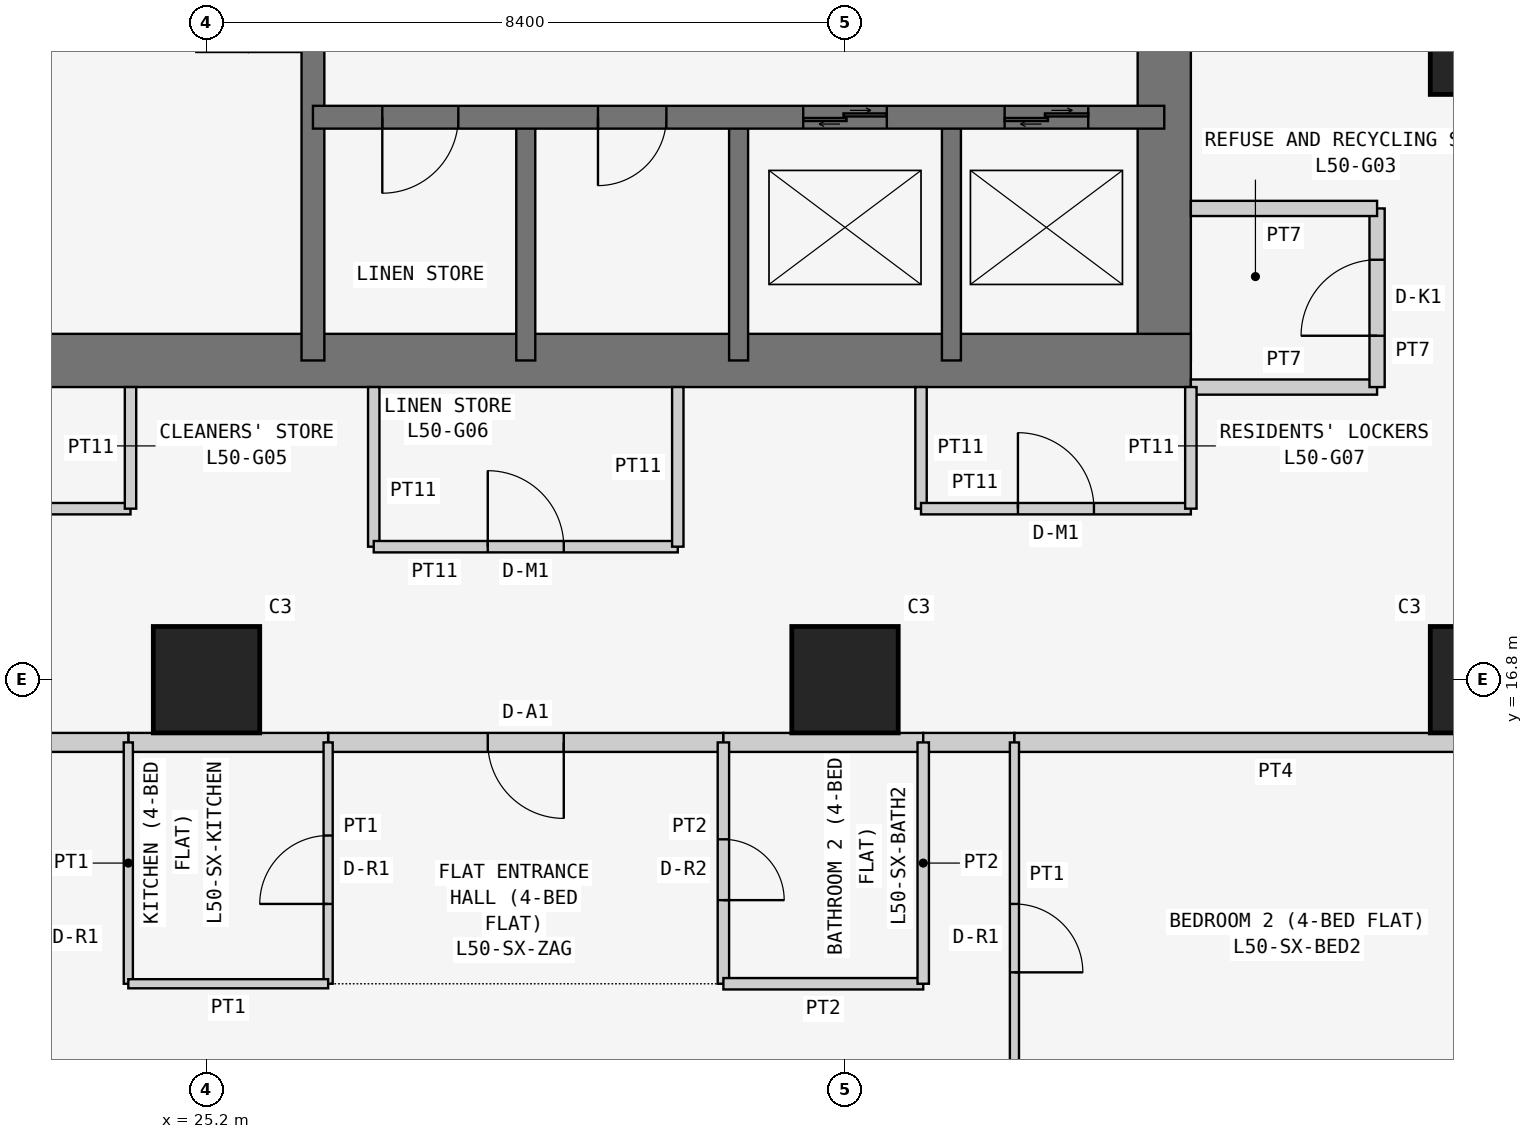
"""IFC4 building model, lengths in metres.
Left out: names, types, materials, properties, quantities, classifications, styles, units other than length and angle.
Written with IfcOpenShell. Run it as: python <this file> out.ifc"""

import sys

from ifc_helpers import new_model, si_unit, direction, frame, frame_2d, origin, origin_2d, place, context, subcontext, project, spatial, rectangle, extrude, element, fill, save


model = new_model("IFC4")
c1 = context("Model", 3, precision=1e-05, world=origin(), true_north=direction((0.0, 1.0)))
c2 = subcontext(c1, "Body", "Model", "MODEL_VIEW")
j1 = project(units=[si_unit("LENGTHUNIT", "METRE"), si_unit("PLANEANGLEUNIT", "RADIAN")], contexts=[c1])
p1 = place(None, origin())
s1 = spatial("IfcSite", under=j1, at=p1, CompositionType="ELEMENT")
p2 = place(p1, origin())
s2 = spatial("IfcBuilding", under=s1, at=p2, CompositionType="ELEMENT")
p3 = place(p2, frame((0.0, 0.0, 194.1)))
s3 = spatial("IfcBuildingStorey", under=s2, at=p3, CompositionType="ELEMENT", Elevation=194.1)
for number, where, z_axis, x_axis in (
    (1, (25.2, 16.8, 0.0), (0.0, 0.0, 1.0), (1.0, 0.0, 0.0)),
    (2, (33.6, 16.8, 0.0), (0.0, 0.0, 1.0), (1.0, 0.0, 0.0)),
    (3, (42.0, 16.8, 0.0), (0.0, 0.0, 1.0), (1.0, 0.0, 0.0)),
    (4, (42.0, 25.2, 0.0), (0.0, 0.0, 1.0), (1.0, 0.0, 0.0)),
):
    element("IfcColumn", number, at=place(p3, frame(where, z_axis=z_axis, x_axis=x_axis)), inside=s3, PredefinedType="COLUMN", context=c2, shape_type="SweptSolid", body=[
        extrude(rectangle(XDim=1.4, YDim=1.4, at=origin_2d()), origin(), (0.0, 0.0, 1.0), 3.6),
    ])
p4 = place(p3, frame((21.0, 21.0, 0.0), z_axis=(0.0, 0.0, 1.0), x_axis=(1.0, 0.0, 0.0)))
e5 = element("IfcWall", 5, at=p4, inside=s3, PredefinedType="SHEAR", context=c2, shape_type="SweptSolid", body=[
    extrude(rectangle(XDim=17.15, YDim=0.7, at=frame_2d((8.575, 0.0))), origin(), (0.0, 0.0, 1.0), 3.6),
])
p5 = place(p3, frame((37.8, 21.0, 0.0), z_axis=(0.0, 0.0, 1.0), x_axis=(0.0, 1.0, 0.0)))
e6 = element("IfcWall", 6, at=p5, inside=s3, PredefinedType="SHEAR", context=c2, shape_type="SweptSolid", body=[
    extrude(rectangle(XDim=17.15, YDim=0.7, at=frame_2d((8.575, 0.0))), origin(), (0.0, 0.0, 1.0), 3.6),
])
p6 = place(p5, frame((5.2, 0.0, 0.0)))
e7 = element("IfcOpeningElement", 7, at=p6, cuts=e6, PredefinedType="OPENING", context=c2, shape_type="SweptSolid", body=[
    extrude(rectangle(XDim=1.2, YDim=2.1, at=frame_2d((0.6, 1.05))), frame((0.0, 0.36, 0.0), z_axis=(0.0, -1.0, 0.0), x_axis=(1.0, 0.0, 0.0)), (0.0, 0.0, 1.0), 0.72),
])
p7 = place(p3, frame((26.6, 21.0, 0.0), z_axis=(0.0, 0.0, 1.0), x_axis=(0.0, 1.0, 0.0)))
e8 = element("IfcWall", 8, at=p7, inside=s3, PredefinedType="SHEAR", context=c2, shape_type="SweptSolid", body=[
    extrude(rectangle(XDim=16.8, YDim=0.3, at=frame_2d((8.4, 0.0))), origin(), (0.0, 0.0, 1.0), 3.6),
])
p8 = place(p7, frame((10.4, 0.0, 0.0)))
e9 = element("IfcOpeningElement", 9, at=p8, cuts=e8, PredefinedType="OPENING", context=c2, shape_type="SweptSolid", body=[
    extrude(rectangle(XDim=1.2, YDim=2.1, at=frame_2d((0.6, 1.05))), frame((0.0, 0.16, 0.0), z_axis=(0.0, -1.0, 0.0), x_axis=(1.0, 0.0, 0.0)), (0.0, 0.0, 1.0), 0.32),
])
p9 = place(p3, frame((26.6, 24.2, 0.0), z_axis=(0.0, 0.0, 1.0), x_axis=(1.0, 0.0, 0.0)))
e10 = element("IfcWall", 10, at=p9, inside=s3, PredefinedType="SHEAR", context=c2, shape_type="SweptSolid", body=[
    extrude(rectangle(XDim=11.2, YDim=0.3, at=frame_2d((5.6, 0.0))), origin(), (0.0, 0.0, 1.0), 3.6),
])
p10 = place(p9, frame((0.913, 0.0, 0.0)))
e11 = element("IfcOpeningElement", 11, at=p10, cuts=e10, PredefinedType="OPENING", context=c2, shape_type="SweptSolid", body=[
    extrude(rectangle(XDim=1.0, YDim=2.1, at=frame_2d((0.5, 1.05))), frame((0.0, 0.16, 0.0), z_axis=(0.0, -1.0, 0.0), x_axis=(1.0, 0.0, 0.0)), (0.0, 0.0, 1.0), 0.32),
])
p11 = place(p9, frame((3.75, 0.0, 0.0)))
e12 = element("IfcOpeningElement", 12, at=p11, cuts=e10, PredefinedType="OPENING", context=c2, shape_type="SweptSolid", body=[
    extrude(rectangle(XDim=0.9, YDim=2.1, at=frame_2d((0.45, 1.05))), frame((0.0, 0.16, 0.0), z_axis=(0.0, -1.0, 0.0), x_axis=(1.0, 0.0, 0.0)), (0.0, 0.0, 1.0), 0.32),
])
p12 = place(p9, frame((6.45, 0.0, 0.0)))
e13 = element("IfcOpeningElement", 13, at=p12, cuts=e10, PredefinedType="OPENING", context=c2, shape_type="SweptSolid", body=[
    extrude(rectangle(XDim=1.1, YDim=2.1, at=frame_2d((0.55, 1.05))), frame((0.0, 0.16, 0.0), z_axis=(0.0, -1.0, 0.0), x_axis=(1.0, 0.0, 0.0)), (0.0, 0.0, 1.0), 0.32),
])
p13 = place(p9, frame((9.1, 0.0, 0.0)))
e14 = element("IfcOpeningElement", 14, at=p13, cuts=e10, PredefinedType="OPENING", context=c2, shape_type="SweptSolid", body=[
    extrude(rectangle(XDim=1.1, YDim=2.1, at=frame_2d((0.55, 1.05))), frame((0.0, 0.16, 0.0), z_axis=(0.0, -1.0, 0.0), x_axis=(1.0, 0.0, 0.0)), (0.0, 0.0, 1.0), 0.32),
])
for number, where, z_axis, x_axis in (
    (15, (29.4, 21.0, 0.0), (0.0, 0.0, 1.0), (0.0, 1.0, 0.0)),
    (16, (32.2, 21.0, 0.0), (0.0, 0.0, 1.0), (0.0, 1.0, 0.0)),
    (17, (35.0, 21.0, 0.0), (0.0, 0.0, 1.0), (0.0, 1.0, 0.0)),
):
    element("IfcWall", number, at=place(p3, frame(where, z_axis=z_axis, x_axis=x_axis)), inside=s3, PredefinedType="SHEAR", context=c2, shape_type="SweptSolid", body=[
        extrude(rectangle(XDim=3.2, YDim=0.25, at=frame_2d((1.6, 0.0))), origin(), (0.0, 0.0, 1.0), 3.6),
    ])
p14 = place(p3, frame((38.15, 20.65, 0.0), z_axis=(0.0, 0.0, 1.0), x_axis=(1.0, 0.0, 0.0)))
e18 = element("IfcWall", 18, at=p14, inside=s3, PredefinedType="PARTITIONING", context=c2, shape_type="SweptSolid", body=[
    extrude(rectangle(XDim=2.45, YDim=0.2, at=frame_2d((1.225, 0.0))), origin(), (0.0, 0.0, 1.0), 3.45),
])
p15 = place(p3, frame((40.6, 20.65, 0.0), z_axis=(0.0, 0.0, 1.0), x_axis=(0.0, 1.0, 0.0)))
e19 = element("IfcWall", 19, at=p15, inside=s3, PredefinedType="PARTITIONING", context=c2, shape_type="SweptSolid", body=[
    extrude(rectangle(XDim=2.35, YDim=0.2, at=frame_2d((1.175, 0.0))), origin(), (0.0, 0.0, 1.0), 3.45),
])
p16 = place(p15, frame((0.675, 0.0, 0.0)))
e20 = element("IfcOpeningElement", 20, at=p16, cuts=e19, PredefinedType="OPENING", context=c2, shape_type="SweptSolid", body=[
    extrude(rectangle(XDim=1.0, YDim=2.1, at=frame_2d((0.5, 1.05))), frame((0.0, 0.11, 0.0), z_axis=(0.0, -1.0, 0.0), x_axis=(1.0, 0.0, 0.0)), (0.0, 0.0, 1.0), 0.22),
])
p17 = place(p3, frame((40.6, 23.0, 0.0), z_axis=(0.0, 0.0, 1.0), x_axis=(-1.0, 0.0, 0.0)))
e21 = element("IfcWall", 21, at=p17, inside=s3, PredefinedType="PARTITIONING", context=c2, shape_type="SweptSolid", body=[
    extrude(rectangle(XDim=2.45, YDim=0.2, at=frame_2d((1.225, 0.0))), origin(), (0.0, 0.0, 1.0), 3.45),
])
p18 = place(p3, frame((20.65, 19.05, 0.0), z_axis=(0.0, 0.0, 1.0), x_axis=(1.0, 0.0, 0.0)))
e22 = element("IfcWall", 22, at=p18, inside=s3, PredefinedType="PARTITIONING", context=c2, shape_type="SweptSolid", body=[
    extrude(rectangle(XDim=3.55, YDim=0.15, at=frame_2d((1.775, 0.0))), origin(), (0.0, 0.0, 1.0), 3.45),
])
p19 = place(p18, frame((1.275, 0.0, 0.0)))
e23 = element("IfcOpeningElement", 23, at=p19, cuts=e22, PredefinedType="OPENING", context=c2, shape_type="SweptSolid", body=[
    extrude(rectangle(XDim=1.0, YDim=2.1, at=frame_2d((0.5, 1.05))), frame((0.0, 0.085, 0.0), z_axis=(0.0, -1.0, 0.0), x_axis=(1.0, 0.0, 0.0)), (0.0, 0.0, 1.0), 0.17),
])
p20 = place(p3, frame((24.2, 19.05, 0.0), z_axis=(0.0, 0.0, 1.0), x_axis=(0.0, 1.0, 0.0)))
e24 = element("IfcWall", 24, at=p20, inside=s3, PredefinedType="PARTITIONING", context=c2, shape_type="SweptSolid", body=[
    extrude(rectangle(XDim=1.6, YDim=0.15, at=frame_2d((0.8, 0.0))), origin(), (0.0, 0.0, 1.0), 3.45),
])
p21 = place(p3, frame((27.4, 20.65, 0.0), z_axis=(0.0, 0.0, 1.0), x_axis=(0.0, -1.0, 0.0)))
e25 = element("IfcWall", 25, at=p21, inside=s3, PredefinedType="PARTITIONING", context=c2, shape_type="SweptSolid", body=[
    extrude(rectangle(XDim=2.1, YDim=0.15, at=frame_2d((1.05, 0.0))), origin(), (0.0, 0.0, 1.0), 3.45),
])
p22 = place(p3, frame((27.4, 18.55, 0.0), z_axis=(0.0, 0.0, 1.0), x_axis=(1.0, 0.0, 0.0)))
e26 = element("IfcWall", 26, at=p22, inside=s3, PredefinedType="PARTITIONING", context=c2, shape_type="SweptSolid", body=[
    extrude(rectangle(XDim=4.0, YDim=0.15, at=frame_2d((2.0, 0.0))), origin(), (0.0, 0.0, 1.0), 3.45),
])
p23 = place(p22, frame((1.5, 0.0, 0.0)))
e27 = element("IfcOpeningElement", 27, at=p23, cuts=e26, PredefinedType="OPENING", context=c2, shape_type="SweptSolid", body=[
    extrude(rectangle(XDim=1.0, YDim=2.1, at=frame_2d((0.5, 1.05))), frame((0.0, 0.085, 0.0), z_axis=(0.0, -1.0, 0.0), x_axis=(1.0, 0.0, 0.0)), (0.0, 0.0, 1.0), 0.17),
])
p24 = place(p3, frame((31.4, 18.55, 0.0), z_axis=(0.0, 0.0, 1.0), x_axis=(0.0, 1.0, 0.0)))
e28 = element("IfcWall", 28, at=p24, inside=s3, PredefinedType="PARTITIONING", context=c2, shape_type="SweptSolid", body=[
    extrude(rectangle(XDim=2.1, YDim=0.15, at=frame_2d((1.05, 0.0))), origin(), (0.0, 0.0, 1.0), 3.45),
])
p25 = place(p3, frame((34.6, 20.65, 0.0), z_axis=(0.0, 0.0, 1.0), x_axis=(0.0, -1.0, 0.0)))
e29 = element("IfcWall", 29, at=p25, inside=s3, PredefinedType="PARTITIONING", context=c2, shape_type="SweptSolid", body=[
    extrude(rectangle(XDim=1.6, YDim=0.15, at=frame_2d((0.8, 0.0))), origin(), (0.0, 0.0, 1.0), 3.45),
])
p26 = place(p3, frame((34.6, 19.05, 0.0), z_axis=(0.0, 0.0, 1.0), x_axis=(1.0, 0.0, 0.0)))
e30 = element("IfcWall", 30, at=p26, inside=s3, PredefinedType="PARTITIONING", context=c2, shape_type="SweptSolid", body=[
    extrude(rectangle(XDim=3.55, YDim=0.15, at=frame_2d((1.775, 0.0))), origin(), (0.0, 0.0, 1.0), 3.45),
])
p27 = place(p26, frame((1.275, 0.0, 0.0)))
e31 = element("IfcOpeningElement", 31, at=p27, cuts=e30, PredefinedType="OPENING", context=c2, shape_type="SweptSolid", body=[
    extrude(rectangle(XDim=1.0, YDim=2.1, at=frame_2d((0.5, 1.05))), frame((0.0, 0.085, 0.0), z_axis=(0.0, -1.0, 0.0), x_axis=(1.0, 0.0, 0.0)), (0.0, 0.0, 1.0), 0.17),
])
p28 = place(p3, frame((38.15, 19.05, 0.0), z_axis=(0.0, 0.0, 1.0), x_axis=(0.0, 1.0, 0.0)))
e32 = element("IfcWall", 32, at=p28, inside=s3, PredefinedType="PARTITIONING", context=c2, shape_type="SweptSolid", body=[
    extrude(rectangle(XDim=1.6, YDim=0.15, at=frame_2d((0.8, 0.0))), origin(), (0.0, 0.0, 1.0), 3.45),
])
p29 = place(p3, frame((32.0, 15.975, 0.0), z_axis=(0.0, 0.0, 1.0), x_axis=(-1.0, 0.0, 0.0)))
e33 = element("IfcWall", 33, at=p29, inside=s3, PredefinedType="PARTITIONING", context=c2, shape_type="SweptSolid", body=[
    extrude(rectangle(XDim=5.2, YDim=0.25, at=frame_2d((2.6, 0.0))), origin(), (0.0, 0.0, 1.0), 3.45),
])
p30 = place(p29, frame((2.1, 0.0, 0.0)))
e34 = element("IfcOpeningElement", 34, at=p30, cuts=e33, PredefinedType="OPENING", context=c2, shape_type="SweptSolid", body=[
    extrude(rectangle(XDim=1.0, YDim=2.1, at=frame_2d((0.5, 1.05))), frame((0.0, 0.135, 0.0), z_axis=(0.0, -1.0, 0.0), x_axis=(1.0, 0.0, 0.0)), (0.0, 0.0, 1.0), 0.27),
])
p31 = place(p3, frame((34.629, 15.975, 0.0), z_axis=(0.0, 0.0, 1.0), x_axis=(-1.0, 0.0, 0.0)))
e35 = element("IfcWall", 35, at=p31, inside=s3, PredefinedType="PARTITIONING", context=c2, shape_type="SweptSolid", body=[
    extrude(rectangle(XDim=2.629, YDim=0.25, at=frame_2d((1.314, 0.0))), origin(), (0.0, 0.0, 1.0), 3.45),
])
p32 = place(p3, frame((26.8, 15.975, 0.0), z_axis=(0.0, 0.0, 1.0), x_axis=(-1.0, 0.0, 0.0)))
e36 = element("IfcWall", 36, at=p32, inside=s3, PredefinedType="PARTITIONING", context=c2, shape_type="SweptSolid", body=[
    extrude(rectangle(XDim=2.629, YDim=0.25, at=frame_2d((1.314, 0.0))), origin(), (0.0, 0.0, 1.0), 3.45),
])
p33 = place(p3, frame((24.171, 15.975, 0.0), z_axis=(0.0, 0.0, 1.0), x_axis=(-1.0, 0.0, 0.0)))
e37 = element("IfcWall", 37, at=p33, inside=s3, PredefinedType="PARTITIONING", context=c2, shape_type="SweptSolid", body=[
    extrude(rectangle(XDim=1.2, YDim=0.25, at=frame_2d((0.6, 0.0))), origin(), (0.0, 0.0, 1.0), 3.45),
])
p34 = place(p3, frame((35.829, 15.975, 0.0), z_axis=(0.0, 0.0, 1.0), x_axis=(-1.0, 0.0, 0.0)))
e38 = element("IfcWall", 38, at=p34, inside=s3, PredefinedType="PARTITIONING", context=c2, shape_type="SweptSolid", body=[
    extrude(rectangle(XDim=1.2, YDim=0.25, at=frame_2d((0.6, 0.0))), origin(), (0.0, 0.0, 1.0), 3.45),
])
p35 = place(p3, frame((42.7, 15.975, 0.0), z_axis=(0.0, 0.0, 1.0), x_axis=(-1.0, 0.0, 0.0)))
e39 = element("IfcWall", 39, at=p35, inside=s3, PredefinedType="PARTITIONING", context=c2, shape_type="SweptSolid", body=[
    extrude(rectangle(XDim=6.871, YDim=0.25, at=frame_2d((3.436, 0.0))), origin(), (0.0, 0.0, 1.0), 3.45),
])
p36 = place(p3, frame((32.0, 12.8, 0.0), z_axis=(0.0, 0.0, 1.0), x_axis=(0.0, 1.0, 0.0)))
e40 = element("IfcWall", 40, at=p36, inside=s3, PredefinedType="PARTITIONING", context=c2, shape_type="SweptSolid", body=[
    extrude(rectangle(XDim=3.175, YDim=0.15, at=frame_2d((1.587, 0.0))), origin(), (0.0, 0.0, 1.0), 3.45),
])
p37 = place(p36, frame((1.1, 0.0, 0.0)))
e41 = element("IfcOpeningElement", 41, at=p37, cuts=e40, PredefinedType="OPENING", context=c2, shape_type="SweptSolid", body=[
    extrude(rectangle(XDim=0.8, YDim=2.1, at=frame_2d((0.4, 1.05))), frame((0.0, 0.085, 0.0), z_axis=(0.0, -1.0, 0.0), x_axis=(1.0, 0.0, 0.0)), (0.0, 0.0, 1.0), 0.17),
])
p38 = place(p3, frame((26.8, 15.975, 0.0), z_axis=(0.0, 0.0, 1.0), x_axis=(0.0, -1.0, 0.0)))
e42 = element("IfcWall", 42, at=p38, inside=s3, PredefinedType="PARTITIONING", context=c2, shape_type="SweptSolid", body=[
    extrude(rectangle(XDim=3.175, YDim=0.12, at=frame_2d((1.587, 0.0))), origin(), (0.0, 0.0, 1.0), 3.45),
])
p39 = place(p38, frame((1.225, 0.0, 0.0)))
e43 = element("IfcOpeningElement", 43, at=p39, cuts=e42, PredefinedType="OPENING", context=c2, shape_type="SweptSolid", body=[
    extrude(rectangle(XDim=0.9, YDim=2.1, at=frame_2d((0.45, 1.05))), frame((0.0, 0.07, 0.0), z_axis=(0.0, -1.0, 0.0), x_axis=(1.0, 0.0, 0.0)), (0.0, 0.0, 1.0), 0.14),
])
p40 = place(p3, frame((32.0, 12.8, 0.0), z_axis=(0.0, 0.0, 1.0), x_axis=(1.0, 0.0, 0.0)))
e44 = element("IfcWall", 44, at=p40, inside=s3, PredefinedType="PARTITIONING", context=c2, shape_type="SweptSolid", body=[
    extrude(rectangle(XDim=2.629, YDim=0.15, at=frame_2d((1.314, 0.0))), origin(), (0.0, 0.0, 1.0), 3.45),
])
p41 = place(p3, frame((34.629, 12.8, 0.0), z_axis=(0.0, 0.0, 1.0), x_axis=(0.0, 1.0, 0.0)))
e45 = element("IfcWall", 45, at=p41, inside=s3, PredefinedType="PARTITIONING", context=c2, shape_type="SweptSolid", body=[
    extrude(rectangle(XDim=3.175, YDim=0.15, at=frame_2d((1.587, 0.0))), origin(), (0.0, 0.0, 1.0), 3.45),
])
p42 = place(p3, frame((24.171, 15.975, 0.0), z_axis=(0.0, 0.0, 1.0), x_axis=(0.0, -1.0, 0.0)))
e46 = element("IfcWall", 46, at=p42, inside=s3, PredefinedType="PARTITIONING", context=c2, shape_type="SweptSolid", body=[
    extrude(rectangle(XDim=3.175, YDim=0.12, at=frame_2d((1.587, 0.0))), origin(), (0.0, 0.0, 1.0), 3.45),
])
p43 = place(p3, frame((24.171, 12.8, 0.0), z_axis=(0.0, 0.0, 1.0), x_axis=(1.0, 0.0, 0.0)))
e47 = element("IfcWall", 47, at=p43, inside=s3, PredefinedType="PARTITIONING", context=c2, shape_type="SweptSolid", body=[
    extrude(rectangle(XDim=2.629, YDim=0.12, at=frame_2d((1.314, 0.0))), origin(), (0.0, 0.0, 1.0), 3.45),
])
p44 = place(p3, frame((35.829, 15.975, 0.0), z_axis=(0.0, 0.0, 1.0), x_axis=(0.0, -1.0, 0.0)))
e48 = element("IfcWall", 48, at=p44, inside=s3, PredefinedType="PARTITIONING", context=c2, shape_type="SweptSolid", body=[
    extrude(rectangle(XDim=4.975, YDim=0.12, at=frame_2d((2.488, 0.0))), origin(), (0.0, 0.0, 1.0), 3.45),
])
p45 = place(p44, frame((2.125, 0.0, 0.0)))
e49 = element("IfcOpeningElement", 49, at=p45, cuts=e48, PredefinedType="OPENING", context=c2, shape_type="SweptSolid", body=[
    extrude(rectangle(XDim=0.9, YDim=2.1, at=frame_2d((0.45, 1.05))), frame((0.0, 0.07, 0.0), z_axis=(0.0, -1.0, 0.0), x_axis=(1.0, 0.0, 0.0)), (0.0, 0.0, 1.0), 0.14),
])
p46 = place(p16, origin())
e50 = element("IfcDoor", 50, at=p46, inside=s3, OperationType="SINGLE_SWING_LEFT", PredefinedType="DOOR", context=c2, shape_type="SweptSolid", body=[
    extrude(rectangle(XDim=1.0, YDim=2.1, at=frame_2d((0.5, 1.05))), frame((0.0, 0.025, 0.0), z_axis=(0.0, -1.0, 0.0), x_axis=(1.0, 0.0, 0.0)), (0.0, 0.0, 1.0), 0.05),
])
fill(e20, e50)
p47 = place(p23, origin())
e51 = element("IfcDoor", 51, at=p47, inside=s3, OperationType="SINGLE_SWING_LEFT", PredefinedType="DOOR", context=c2, shape_type="SweptSolid", body=[
    extrude(rectangle(XDim=1.0, YDim=2.1, at=frame_2d((0.5, 1.05))), frame((0.0, 0.025, 0.0), z_axis=(0.0, -1.0, 0.0), x_axis=(1.0, 0.0, 0.0)), (0.0, 0.0, 1.0), 0.05),
])
fill(e27, e51)
p48 = place(p27, origin())
e52 = element("IfcDoor", 52, at=p48, inside=s3, OperationType="SINGLE_SWING_LEFT", PredefinedType="DOOR", context=c2, shape_type="SweptSolid", body=[
    extrude(rectangle(XDim=1.0, YDim=2.1, at=frame_2d((0.5, 1.05))), frame((0.0, 0.025, 0.0), z_axis=(0.0, -1.0, 0.0), x_axis=(1.0, 0.0, 0.0)), (0.0, 0.0, 1.0), 0.05),
])
fill(e31, e52)
p49 = place(p30, origin())
e53 = element("IfcDoor", 53, at=p49, inside=s3, OperationType="SINGLE_SWING_LEFT", PredefinedType="DOOR", context=c2, shape_type="SweptSolid", body=[
    extrude(rectangle(XDim=1.0, YDim=2.1, at=frame_2d((0.5, 1.05))), frame((0.0, 0.025, 0.0), z_axis=(0.0, -1.0, 0.0), x_axis=(1.0, 0.0, 0.0)), (0.0, 0.0, 1.0), 0.05),
])
fill(e34, e53)
p50 = place(p37, frame((0.8, 0.0, 0.0), z_axis=(0.0, 0.0, 1.0), x_axis=(-1.0, 0.0, 0.0)))
e54 = element("IfcDoor", 54, at=p50, inside=s3, OperationType="SINGLE_SWING_RIGHT", PredefinedType="DOOR", context=c2, shape_type="SweptSolid", body=[
    extrude(rectangle(XDim=0.8, YDim=2.1, at=frame_2d((0.4, 1.05))), frame((0.0, 0.025, 0.0), z_axis=(0.0, -1.0, 0.0), x_axis=(1.0, 0.0, 0.0)), (0.0, 0.0, 1.0), 0.05),
])
fill(e41, e54)
p51 = place(p39, frame((0.9, 0.0, 0.0), z_axis=(0.0, 0.0, 1.0), x_axis=(-1.0, 0.0, 0.0)))
e55 = element("IfcDoor", 55, at=p51, inside=s3, OperationType="SINGLE_SWING_LEFT", PredefinedType="DOOR", context=c2, shape_type="SweptSolid", body=[
    extrude(rectangle(XDim=0.9, YDim=2.1, at=frame_2d((0.45, 1.05))), frame((0.0, 0.025, 0.0), z_axis=(0.0, -1.0, 0.0), x_axis=(1.0, 0.0, 0.0)), (0.0, 0.0, 1.0), 0.05),
])
fill(e43, e55)
p52 = place(p45, origin())
e56 = element("IfcDoor", 56, at=p52, inside=s3, OperationType="SINGLE_SWING_RIGHT", PredefinedType="DOOR", context=c2, shape_type="SweptSolid", body=[
    extrude(rectangle(XDim=0.9, YDim=2.1, at=frame_2d((0.45, 1.05))), frame((0.0, 0.025, 0.0), z_axis=(0.0, -1.0, 0.0), x_axis=(1.0, 0.0, 0.0)), (0.0, 0.0, 1.0), 0.05),
])
fill(e49, e56)
p53 = place(p10, frame((1.0, 0.0, 0.0), z_axis=(0.0, 0.0, 1.0), x_axis=(-1.0, 0.0, 0.0)))
e57 = element("IfcDoor", 57, at=p53, inside=s3, OperationType="SINGLE_SWING_RIGHT", PredefinedType="DOOR", context=c2, shape_type="SweptSolid", body=[
    extrude(rectangle(XDim=1.0, YDim=2.1, at=frame_2d((0.5, 1.05))), frame((0.0, 0.025, 0.0), z_axis=(0.0, -1.0, 0.0), x_axis=(1.0, 0.0, 0.0)), (0.0, 0.0, 1.0), 0.05),
])
fill(e11, e57)
p54 = place(p11, frame((0.9, 0.0, 0.0), z_axis=(0.0, 0.0, 1.0), x_axis=(-1.0, 0.0, 0.0)))
e58 = element("IfcDoor", 58, at=p54, inside=s3, OperationType="SINGLE_SWING_RIGHT", PredefinedType="DOOR", context=c2, shape_type="SweptSolid", body=[
    extrude(rectangle(XDim=0.9, YDim=2.1, at=frame_2d((0.45, 1.05))), frame((0.0, 0.025, 0.0), z_axis=(0.0, -1.0, 0.0), x_axis=(1.0, 0.0, 0.0)), (0.0, 0.0, 1.0), 0.05),
])
fill(e12, e58)
p55 = place(p12, origin())
e59 = element("IfcDoor", 59, at=p55, inside=s3, OperationType="DOUBLE_DOOR_SLIDING", PredefinedType="DOOR", context=c2, shape_type="SweptSolid", body=[
    extrude(rectangle(XDim=1.1, YDim=2.1, at=frame_2d((0.55, 1.05))), frame((0.0, 0.025, 0.0), z_axis=(0.0, -1.0, 0.0), x_axis=(1.0, 0.0, 0.0)), (0.0, 0.0, 1.0), 0.05),
])
fill(e13, e59)
p56 = place(p13, origin())
e60 = element("IfcDoor", 60, at=p56, inside=s3, OperationType="DOUBLE_DOOR_SLIDING", PredefinedType="DOOR", context=c2, shape_type="SweptSolid", body=[
    extrude(rectangle(XDim=1.1, YDim=2.1, at=frame_2d((0.55, 1.05))), frame((0.0, 0.025, 0.0), z_axis=(0.0, -1.0, 0.0), x_axis=(1.0, 0.0, 0.0)), (0.0, 0.0, 1.0), 0.05),
])
fill(e14, e60)
save(model, sys.argv[1])
